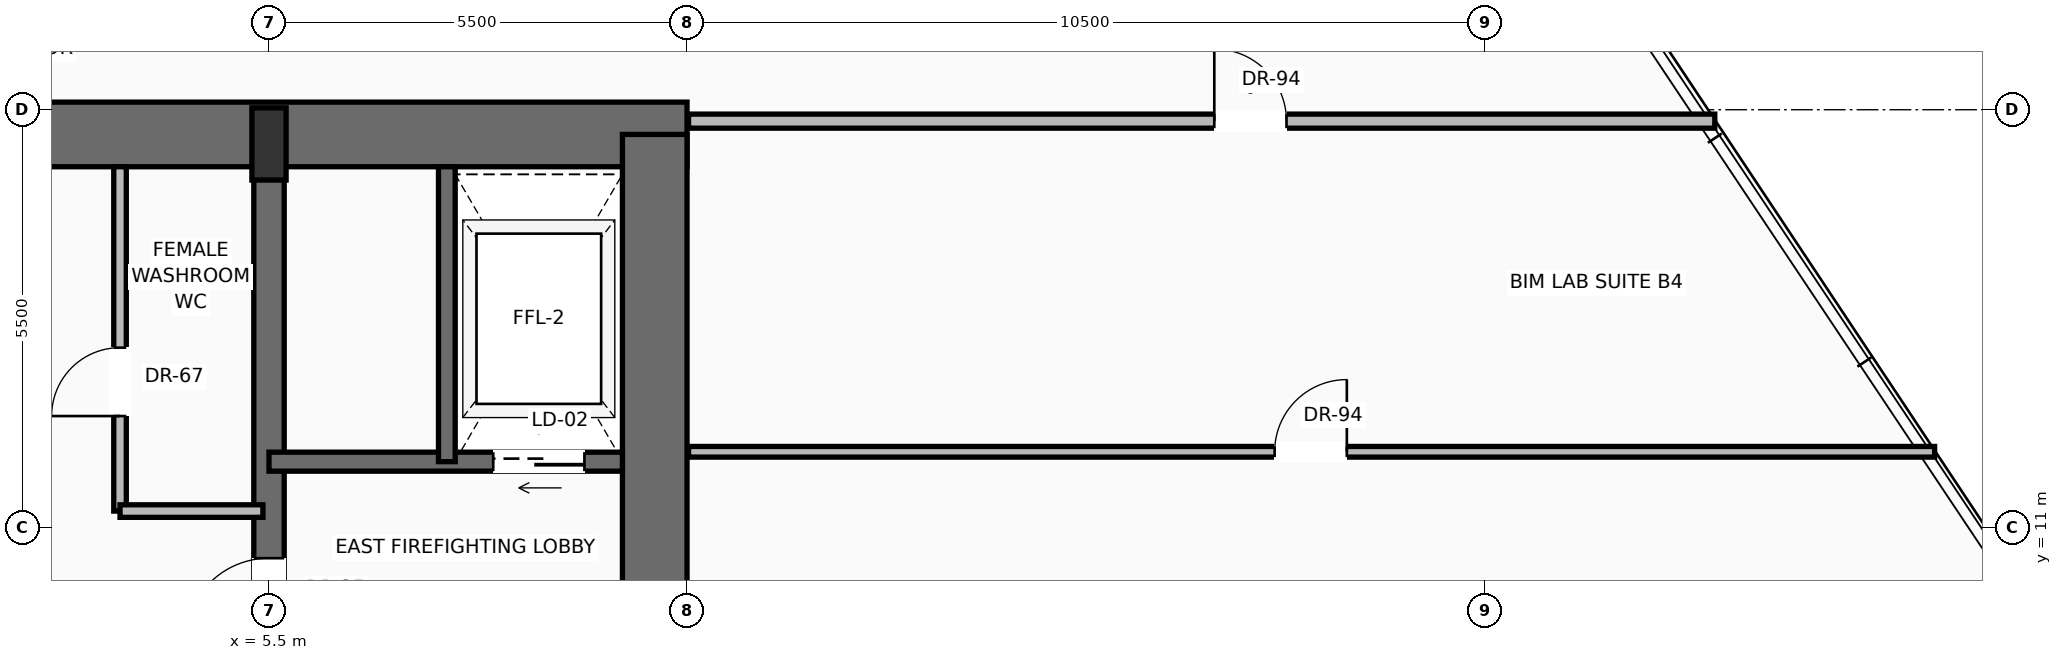
"""IFC4 building model, lengths in metres.
Left out: names, types, materials, properties, quantities, classifications, styles, units other than length and angle.
Written with IfcOpenShell. Run it as: python <this file> out.ifc"""

import sys

from ifc_helpers import new_model, si_unit, direction, frame, frame_2d, origin, origin_2d, place, context, subcontext, project, spatial, rectangle, extrude, source, transform, mapped, element, fill, save


model = new_model("IFC4")
c1 = context("Model", 3, precision=1e-05, world=origin(), true_north=direction((0.0, 1.0)))
c2 = subcontext(c1, "Body", "Model", "MODEL_VIEW")
j1 = project(units=[si_unit("LENGTHUNIT", "METRE"), si_unit("PLANEANGLEUNIT", "RADIAN")], contexts=[c1])
p1 = place(None, origin())
s1 = spatial("IfcSite", under=j1, at=p1, CompositionType="ELEMENT")
p2 = place(p1, origin())
s2 = spatial("IfcBuilding", under=s1, at=p2, CompositionType="ELEMENT")
p3 = place(p2, frame((0.0, 0.0, 57.1)))
s3 = spatial("IfcBuildingStorey", under=s2, at=p3, CompositionType="ELEMENT", Elevation=57.1)
p4 = place(p3, frame((-11.0, 16.175, 0.0), z_axis=(0.0, 0.0, 1.0), x_axis=(1.0, 0.0, 0.0)))
e1 = element("IfcWall", 1, at=p4, inside=s3, PredefinedType="SHEAR", context=c2, shape_type="SweptSolid", body=[
    extrude(rectangle(XDim=22.0, YDim=0.85, at=frame_2d((11.0, 0.0))), origin(), (0.0, 0.0, 1.0), 3.45),
])
p5 = place(p4, frame((3.57, 0.0, 0.0)))
e2 = element("IfcOpeningElement", 2, at=p5, cuts=e1, PredefinedType="OPENING", context=c2, shape_type="SweptSolid", body=[
    extrude(rectangle(XDim=1.3, YDim=2.3, at=frame_2d((0.65, 1.15))), frame((0.0, 0.435, 0.0), z_axis=(0.0, -1.0, 0.0), x_axis=(1.0, 0.0, 0.0)), (0.0, 0.0, 1.0), 0.87),
])
p6 = place(p4, frame((10.0, 0.0, 0.0)))
e3 = element("IfcOpeningElement", 3, at=p6, cuts=e1, PredefinedType="OPENING", context=c2, shape_type="SweptSolid", body=[
    extrude(rectangle(XDim=2.0, YDim=2.4, at=frame_2d((1.0, 1.2))), frame((0.0, 0.435, 0.0), z_axis=(0.0, -1.0, 0.0), x_axis=(1.0, 0.0, 0.0)), (0.0, 0.0, 1.0), 0.87),
])
p7 = place(p3, frame((10.575, 0.425, 0.0), z_axis=(0.0, 0.0, 1.0), x_axis=(0.0, 1.0, 0.0)))
e4 = element("IfcWall", 4, at=p7, inside=s3, PredefinedType="SHEAR", context=c2, shape_type="SweptSolid", body=[
    extrude(rectangle(XDim=15.75, YDim=0.85, at=frame_2d((7.875, 0.0))), origin(), (0.0, 0.0, 1.0), 3.45),
])
p8 = place(p3, frame((5.5, 0.425, 0.0), z_axis=(0.0, 0.0, 1.0), x_axis=(0.0, 1.0, 0.0)))
e5 = element("IfcWall", 5, at=p8, inside=s3, PredefinedType="SHEAR", context=c2, shape_type="SweptSolid", body=[
    extrude(rectangle(XDim=15.75, YDim=0.4, at=frame_2d((7.875, 0.0))), origin(), (0.0, 0.0, 1.0), 3.45),
])
p9 = place(p8, frame((9.075, 0.0, 0.0)))
e6 = element("IfcOpeningElement", 6, at=p9, cuts=e5, PredefinedType="OPENING", context=c2, shape_type="SweptSolid", body=[
    extrude(rectangle(XDim=1.1, YDim=2.2, at=frame_2d((0.55, 1.1))), frame((0.0, 0.21, 0.0), z_axis=(0.0, -1.0, 0.0), x_axis=(1.0, 0.0, 0.0)), (0.0, 0.0, 1.0), 0.42),
])
m1 = source(origin(), c2, "Body", "SweptSolid", [
    extrude(rectangle(XDim=0.45, YDim=0.95, at=origin_2d()), origin(), (0.0, 0.0, 1.0), 3.7),
])
p10 = place(p3, frame((5.5, 16.05, 0.0), z_axis=(0.0, 0.0, 1.0), x_axis=(1.0, 0.0, 0.0)))
e7 = element("IfcColumn", 7, at=p10, inside=s3, PredefinedType="PILASTER", context=c2, shape_type="MappedRepresentation", body=[
    mapped(m1, transform((0.0, 0.0, 0.0), scale=1.0)),
])
p11 = place(p3, frame((10.15, 11.87, 0.0), z_axis=(0.0, 0.0, 1.0), x_axis=(-1.0, 0.0, 0.0)))
e8 = element("IfcWall", 8, at=p11, inside=s3, PredefinedType="SOLIDWALL", context=c2, shape_type="SweptSolid", body=[
    extrude(rectangle(XDim=4.65, YDim=0.25, at=frame_2d((2.325, 0.0))), origin(), (0.0, 0.0, 1.0), 3.45),
])
p12 = place(p11, frame((0.5, 0.0, 0.0)))
e9 = element("IfcOpeningElement", 9, at=p12, cuts=e8, PredefinedType="OPENING", context=c2, shape_type="SweptSolid", body=[
    extrude(rectangle(XDim=1.2, YDim=2.25, at=frame_2d((0.6, 1.125))), frame((0.0, 0.135, 0.0), z_axis=(0.0, -1.0, 0.0), x_axis=(1.0, 0.0, 0.0)), (0.0, 0.0, 1.0), 0.27),
])
p13 = place(p3, frame((7.84, 11.87, 0.0), z_axis=(0.0, 0.0, 1.0), x_axis=(0.0, 1.0, 0.0)))
e10 = element("IfcWall", 10, at=p13, inside=s3, PredefinedType="SOLIDWALL", context=c2, shape_type="SweptSolid", body=[
    extrude(rectangle(XDim=3.88, YDim=0.22, at=frame_2d((1.94, 0.0))), origin(), (0.0, 0.0, 1.0), 3.45),
])
p14 = place(p3, frame((3.54, 11.22, 0.0), z_axis=(0.0, 0.0, 1.0), x_axis=(0.0, 1.0, 0.0)))
e11 = element("IfcWall", 11, at=p14, inside=s3, PredefinedType="PARTITIONING", context=c2, shape_type="SweptSolid", body=[
    extrude(rectangle(XDim=4.53, YDim=0.165, at=frame_2d((2.265, 0.0))), origin(), (0.0, 0.0, 1.0), 3.442),
])
p15 = place(p14, frame((1.25, 0.0, 0.0)))
e12 = element("IfcOpeningElement", 12, at=p15, cuts=e11, PredefinedType="OPENING", context=c2, shape_type="SweptSolid", body=[
    extrude(rectangle(XDim=0.9, YDim=2.1, at=frame_2d((0.45, 1.05))), frame((0.0, 0.093, 0.0), z_axis=(0.0, -1.0, 0.0), x_axis=(1.0, 0.0, 0.0)), (0.0, 0.0, 1.0), 0.185),
])
p16 = place(p3, frame((3.54, 11.22, 0.0), z_axis=(0.0, 0.0, 1.0), x_axis=(1.0, 0.0, 0.0)))
e13 = element("IfcWall", 13, at=p16, inside=s3, PredefinedType="PARTITIONING", context=c2, shape_type="SweptSolid", body=[
    extrude(rectangle(XDim=1.88, YDim=0.165, at=frame_2d((0.94, 0.0))), origin(), (0.0, 0.0, 1.0), 3.442),
])
p17 = place(p3, frame((11.02, 16.35, 0.0), z_axis=(0.0, 0.0, 1.0), x_axis=(1.0, 0.0, 0.0)))
e14 = element("IfcWall", 14, at=p17, inside=s3, PredefinedType="PARTITIONING", context=c2, shape_type="SweptSolid", body=[
    extrude(rectangle(XDim=13.502, YDim=0.185, at=frame_2d((6.751, 0.0))), origin(), (0.0, 0.0, 1.0), 2.747),
])
p18 = place(p17, frame((6.917, 0.0, 0.0)))
e15 = element("IfcOpeningElement", 15, at=p18, cuts=e14, PredefinedType="OPENING", context=c2, shape_type="SweptSolid", body=[
    extrude(rectangle(XDim=0.95, YDim=2.2, at=frame_2d((0.475, 1.1))), frame((0.0, 0.103, 0.0), z_axis=(0.0, -1.0, 0.0), x_axis=(1.0, 0.0, 0.0)), (0.0, 0.0, 1.0), 0.205),
])
p19 = place(p3, frame((11.02, 12.0, 0.0), z_axis=(0.0, 0.0, 1.0), x_axis=(1.0, 0.0, 0.0)))
e16 = element("IfcWall", 16, at=p19, inside=s3, PredefinedType="PARTITIONING", context=c2, shape_type="SweptSolid", body=[
    extrude(rectangle(XDim=16.395, YDim=0.14, at=frame_2d((8.197, 0.0))), origin(), (0.0, 0.0, 1.0), 3.442),
])
p20 = place(p19, frame((7.711, 0.0, 0.0)))
e17 = element("IfcOpeningElement", 17, at=p20, cuts=e16, PredefinedType="OPENING", context=c2, shape_type="SweptSolid", body=[
    extrude(rectangle(XDim=0.95, YDim=2.2, at=frame_2d((0.475, 1.1))), frame((0.0, 0.08, 0.0), z_axis=(0.0, -1.0, 0.0), x_axis=(1.0, 0.0, 0.0)), (0.0, 0.0, 1.0), 0.16),
])
m2 = source(origin(), c2, "Body", "SweptSolid", [
    extrude(rectangle(XDim=1.1, YDim=2.2, at=frame_2d((0.55, 1.1))), frame((0.0, 0.025, 0.0), z_axis=(0.0, -1.0, 0.0), x_axis=(1.0, 0.0, 0.0)), (0.0, 0.0, 1.0), 0.05),
])
p21 = place(p9, origin())
e18 = element("IfcDoor", 18, at=p21, inside=s3, OperationType="SINGLE_SWING_LEFT", PredefinedType="DOOR", context=c2, shape_type="MappedRepresentation", body=[
    mapped(m2, transform((0.0, 0.0, 0.0), scale=1.0)),
])
fill(e6, e18)
m3 = source(origin(), c2, "Body", "SweptSolid", [
    extrude(rectangle(XDim=1.2, YDim=2.25, at=frame_2d((0.6, 1.125))), frame((0.0, 0.025, 0.0), z_axis=(0.0, -1.0, 0.0), x_axis=(1.0, 0.0, 0.0)), (0.0, 0.0, 1.0), 0.05),
])
p22 = place(p12, origin())
e19 = element("IfcDoor", 19, at=p22, inside=s3, OperationType="SLIDING_TO_RIGHT", PredefinedType="DOOR", context=c2, shape_type="MappedRepresentation", body=[
    mapped(m3, transform((0.0, 0.0, 0.0), scale=1.0)),
])
fill(e9, e19)
m4 = source(origin(), c2, "Body", "SweptSolid", [
    extrude(rectangle(XDim=0.9, YDim=2.1, at=frame_2d((0.45, 1.05))), frame((0.0, 0.025, 0.0), z_axis=(0.0, -1.0, 0.0), x_axis=(1.0, 0.0, 0.0)), (0.0, 0.0, 1.0), 0.05),
])
p23 = place(p15, origin())
e20 = element("IfcDoor", 20, at=p23, inside=s3, OperationType="SINGLE_SWING_LEFT", PredefinedType="DOOR", context=c2, shape_type="MappedRepresentation", body=[
    mapped(m4, transform((0.0, 0.0, 0.0), scale=1.0)),
])
fill(e12, e20)
m5 = source(origin(), c2, "Body", "SweptSolid", [
    extrude(rectangle(XDim=0.95, YDim=2.2, at=frame_2d((0.475, 1.1))), frame((0.0, 0.025, 0.0), z_axis=(0.0, -1.0, 0.0), x_axis=(1.0, 0.0, 0.0)), (0.0, 0.0, 1.0), 0.05),
])
p24 = place(p18, origin())
e21 = element("IfcDoor", 21, at=p24, inside=s3, OperationType="SINGLE_SWING_LEFT", PredefinedType="DOOR", context=c2, shape_type="MappedRepresentation", body=[
    mapped(m5, transform((0.0, 0.0, 0.0), scale=1.0)),
])
fill(e15, e21)
p25 = place(p20, origin())
e22 = element("IfcDoor", 22, at=p25, inside=s3, OperationType="SINGLE_SWING_RIGHT", PredefinedType="DOOR", context=c2, shape_type="MappedRepresentation", body=[
    mapped(m5, transform((0.0, 0.0, 0.0), scale=1.0)),
])
fill(e17, e22)
save(model, sys.argv[1])
